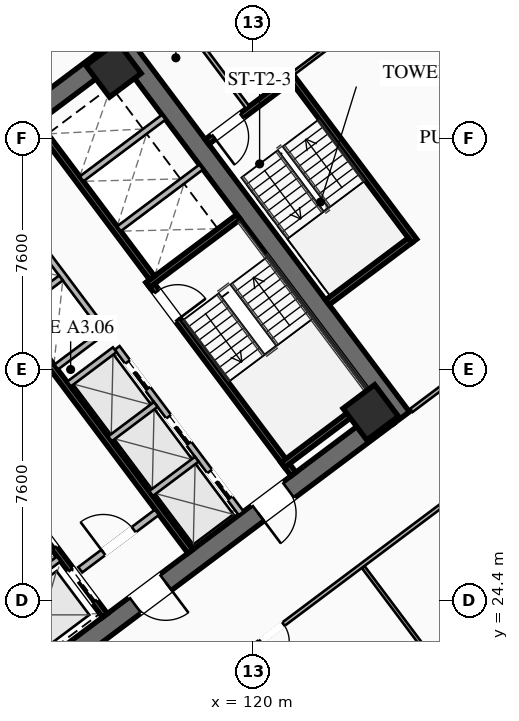
"""IFC4 building model, lengths in metres.
Left out: names, types, materials, properties, quantities, classifications, styles, units other than length and angle.
Written with IfcOpenShell. Run it as: python <this file> out.ifc"""

import sys

from ifc_helpers import new_model, si_unit, direction, frame, frame_2d, origin, origin_2d, place, context, subcontext, project, spatial, rectangle, hollow_rectangle, extrude, element, fill, save


model = new_model("IFC4")
c1 = context("Model", 3, precision=1e-05, world=origin(), true_north=direction((0.0, 1.0)))
c2 = subcontext(c1, "Body", "Model", "MODEL_VIEW")
j1 = project(units=[si_unit("LENGTHUNIT", "METRE"), si_unit("PLANEANGLEUNIT", "RADIAN")], contexts=[c1])
p1 = place(None, origin())
s1 = spatial("IfcSite", under=j1, at=p1, CompositionType="ELEMENT")
p2 = place(p1, origin())
s2 = spatial("IfcBuilding", under=s1, at=p2, CompositionType="ELEMENT")
p3 = place(p2, frame((0.0, 0.0, 28.15)))
s3 = spatial("IfcBuildingStorey", under=s2, at=p3, CompositionType="ELEMENT", Elevation=28.15)
p4 = place(p3, frame((115.524, 42.893, 0.0), z_axis=(0.0, 0.0, 1.0), x_axis=(0.600005007985, -0.799996243986, 0.0)))
e1 = element("IfcWall", 1, at=p4, inside=s3, PredefinedType="SHEAR", context=c2, shape_type="SweptSolid", body=[
    extrude(rectangle(XDim=15.6, YDim=0.65, at=frame_2d((7.8, 0.0))), origin(), (0.0, 0.0, 1.0), 3.55),
])
p5 = place(p3, frame((124.429, 30.478, 0.0), z_axis=(0.0, 0.0, 1.0), x_axis=(-0.799998028465, -0.600002628705, 0.0)))
e2 = element("IfcWall", 2, at=p5, inside=s3, PredefinedType="SHEAR", context=c2, shape_type="SweptSolid", body=[
    extrude(rectangle(XDim=14.86, YDim=0.65, at=frame_2d((7.43, 0.0))), origin(), (0.0, 0.0, 1.0), 3.55),
])
p6 = place(p5, frame((9.13, 0.0, 0.0)))
e3 = element("IfcOpeningElement", 3, at=p6, cuts=e2, PredefinedType="OPENING", context=c2, shape_type="SweptSolid", body=[
    extrude(rectangle(XDim=1.25, YDim=2.25, at=frame_2d((0.625, 1.125))), frame((0.0, 0.335, 0.0), z_axis=(0.0, -1.0, 0.0), x_axis=(1.0, 0.0, 0.0)), (0.0, 0.0, 1.0), 0.67),
])
p7 = place(p5, frame((4.08, 0.0, 0.0)))
e4 = element("IfcOpeningElement", 4, at=p7, cuts=e2, PredefinedType="OPENING", context=c2, shape_type="SweptSolid", body=[
    extrude(rectangle(XDim=1.25, YDim=2.25, at=frame_2d((0.625, 1.125))), frame((0.0, 0.335, 0.0), z_axis=(0.0, -1.0, 0.0), x_axis=(1.0, 0.0, 0.0)), (0.0, 0.0, 1.0), 0.67),
])
p8 = place(p3, frame((103.571, 33.522, 0.0), z_axis=(0.0, 0.0, 1.0), x_axis=(0.799998028465, 0.600002628705, 0.0)))
e5 = element("IfcWall", 5, at=p8, inside=s3, PredefinedType="SHEAR", context=c2, shape_type="SweptSolid", body=[
    extrude(rectangle(XDim=14.86, YDim=0.65, at=frame_2d((7.43, 0.0))), origin(), (0.0, 0.0, 1.0), 3.55),
])
p9 = place(p8, frame((4.48, 0.0, 0.0)))
e6 = element("IfcOpeningElement", 6, at=p9, cuts=e5, PredefinedType="OPENING", context=c2, shape_type="SweptSolid", body=[
    extrude(rectangle(XDim=1.25, YDim=2.25, at=frame_2d((0.625, 1.125))), frame((0.0, 0.335, 0.0), z_axis=(0.0, -1.0, 0.0), x_axis=(1.0, 0.0, 0.0)), (0.0, 0.0, 1.0), 0.67),
])
p10 = place(p8, frame((9.53, 0.0, 0.0)))
e7 = element("IfcOpeningElement", 7, at=p10, cuts=e5, PredefinedType="OPENING", context=c2, shape_type="SweptSolid", body=[
    extrude(rectangle(XDim=1.25, YDim=2.25, at=frame_2d((0.625, 1.125))), frame((0.0, 0.335, 0.0), z_axis=(0.0, -1.0, 0.0), x_axis=(1.0, 0.0, 0.0)), (0.0, 0.0, 1.0), 0.67),
])
for number, where, z_axis, x_axis in (
    (8, (123.87, 30.59, 0.0), (0.0, 0.0, 1.0), (0.8, 0.6, 0.0)),
    (9, (115.41, 41.87, 0.0), (0.0, 0.0, 1.0), (0.8, 0.6, 0.0)),
):
    element("IfcColumn", number, at=place(p3, frame(where, z_axis=z_axis, x_axis=x_axis)), inside=s3, PredefinedType="COLUMN", context=c2, shape_type="SweptSolid", body=[
        extrude(hollow_rectangle(XDim=1.3, YDim=1.3, WallThickness=0.05, at=origin_2d()), origin(), (0.0, 0.0, 1.0), 3.35),
    ])
p11 = place(p3, frame((116.56, 34.92, 0.0), z_axis=(0.0, 0.0, 1.0), x_axis=(0.600009827119, -0.799992629566, 0.0)))
e10 = element("IfcWall", 10, at=p11, inside=s3, PredefinedType="SHEAR", context=c2, shape_type="SweptSolid", body=[
    extrude(rectangle(XDim=7.95, YDim=0.2, at=frame_2d((3.975, 0.0))), origin(), (0.0, 0.0, 1.0), 3.35),
])
p12 = place(p11, frame((0.45, 0.0, 0.0)))
e11 = element("IfcOpeningElement", 11, at=p12, cuts=e10, PredefinedType="OPENING", context=c2, shape_type="SweptSolid", body=[
    extrude(rectangle(XDim=1.15, YDim=2.2, at=frame_2d((0.575, 1.1))), frame((0.0, 0.11, 0.0), z_axis=(0.0, -1.0, 0.0), x_axis=(1.0, 0.0, 0.0)), (0.0, 0.0, 1.0), 0.22),
])
for number, where, z_axis, x_axis in (
    (12, (116.54, 34.78, 0.0), (0.0, 0.0, 1.0), (0.8, 0.6, 0.0)),
    (13, (120.98, 28.86, 0.0), (0.0, 0.0, 1.0), (0.8, 0.6, 0.0)),
):
    element("IfcWall", number, at=place(p3, frame(where, z_axis=z_axis, x_axis=x_axis)), inside=s3, PredefinedType="SHEAR", context=c2, shape_type="SweptSolid", body=[
        extrude(rectangle(XDim=3.73, YDim=0.2, at=frame_2d((1.865, 0.0))), origin(), (0.0, 0.0, 1.0), 3.35),
    ])
p13 = place(p3, frame((117.938, 26.016, 0.0), z_axis=(0.0, 0.0, 1.0), x_axis=(-0.600005463273, 0.799995902516, 0.0)))
e14 = element("IfcWall", 14, at=p13, inside=s3, PredefinedType="SHEAR", context=c2, shape_type="SweptSolid", body=[
    extrude(rectangle(XDim=14.3, YDim=0.2, at=frame_2d((7.15, 0.0))), origin(), (0.0, 0.0, 1.0), 3.35),
])
p14 = place(p3, frame((114.316, 25.412, 0.0), z_axis=(0.0, 0.0, 1.0), x_axis=(0.800018601094, 0.59997519774, 0.0)))
e15 = element("IfcWall", 15, at=p14, inside=s3, PredefinedType="SOLIDWALL", context=c2, shape_type="SweptSolid", body=[
    extrude(rectangle(XDim=3.15, YDim=0.22, at=frame_2d((1.575, 0.0))), origin(), (0.0, 0.0, 1.0), 2.703),
])
p15 = place(p14, frame((0.95, 0.0, 0.0)))
e16 = element("IfcOpeningElement", 16, at=p15, cuts=e15, PredefinedType="OPENING", context=c2, shape_type="SweptSolid", body=[
    extrude(rectangle(XDim=1.25, YDim=2.25, at=frame_2d((0.625, 1.125))), frame((0.0, 0.12, 0.0), z_axis=(0.0, -1.0, 0.0), x_axis=(1.0, 0.0, 0.0)), (0.0, 0.0, 1.0), 0.24),
])
p16 = place(p3, frame((115.13, 23.91, 0.0), z_axis=(0.0, 0.0, 1.0), x_axis=(-0.599975393228, 0.800018454488, 0.0)))
e17 = element("IfcWall", 17, at=p16, inside=s3, PredefinedType="SHEAR", context=c2, shape_type="SweptSolid", body=[
    extrude(rectangle(XDim=6.35, YDim=0.2, at=frame_2d((3.175, 0.0))), origin(), (0.0, 0.0, 1.0), 3.35),
])
p17 = place(p16, frame((4.775, 0.0, 0.0)))
e18 = element("IfcOpeningElement", 18, at=p17, cuts=e17, PredefinedType="OPENING", context=c2, shape_type="SweptSolid", body=[
    extrude(rectangle(XDim=1.3, YDim=2.25, at=frame_2d((0.65, 1.125))), frame((0.0, 0.11, 0.0), z_axis=(0.0, -1.0, 0.0), x_axis=(1.0, 0.0, 0.0)), (0.0, 0.0, 1.0), 0.22),
])
p18 = place(p16, frame((2.775, 0.0, 0.0)))
e19 = element("IfcOpeningElement", 19, at=p18, cuts=e17, PredefinedType="OPENING", context=c2, shape_type="SweptSolid", body=[
    extrude(rectangle(XDim=1.3, YDim=2.25, at=frame_2d((0.65, 1.125))), frame((0.0, 0.11, 0.0), z_axis=(0.0, -1.0, 0.0), x_axis=(1.0, 0.0, 0.0)), (0.0, 0.0, 1.0), 0.22),
])
p19 = place(p16, frame((0.575, 0.0, 0.0)))
e20 = element("IfcOpeningElement", 20, at=p19, cuts=e17, PredefinedType="OPENING", context=c2, shape_type="SweptSolid", body=[
    extrude(rectangle(XDim=1.3, YDim=2.25, at=frame_2d((0.65, 1.125))), frame((0.0, 0.11, 0.0), z_axis=(0.0, -1.0, 0.0), x_axis=(1.0, 0.0, 0.0)), (0.0, 0.0, 1.0), 0.22),
])
p20 = place(p3, frame((110.906, 23.742, 0.0), z_axis=(0.0, 0.0, 1.0), x_axis=(0.8, 0.6, 0.0)))
e21 = element("IfcWall", 21, at=p20, inside=s3, PredefinedType="SOLIDWALL", context=c2, shape_type="SweptSolid", body=[
    extrude(rectangle(XDim=3.38, YDim=0.2, at=frame_2d((1.69, 0.0))), origin(), (0.0, 0.0, 1.0), 3.35),
])
p21 = place(p3, frame((112.87, 40.09, 0.0), z_axis=(0.0, 0.0, 1.0), x_axis=(0.599975393228, -0.800018454488, 0.0)))
e22 = element("IfcWall", 22, at=p21, inside=s3, PredefinedType="SHEAR", context=c2, shape_type="SweptSolid", body=[
    extrude(rectangle(XDim=6.35, YDim=0.2, at=frame_2d((3.175, 0.0))), origin(), (0.0, 0.0, 1.0), 3.35),
])
for number, where, z_axis, x_axis in (
    (23, (115.59, 36.63, 0.0), (0.0, 0.0, 1.0), (0.8, 0.6, 0.0)),
    (24, (114.36, 38.27, 0.0), (0.0, 0.0, 1.0), (0.8, 0.6, 0.0)),
):
    element("IfcWall", number, at=place(p3, frame(where, z_axis=z_axis, x_axis=x_axis)), inside=s3, PredefinedType="SOLIDWALL", context=c2, shape_type="SweptSolid", body=[
        extrude(rectangle(XDim=3.38, YDim=0.2, at=frame_2d((1.69, 0.0))), origin(), (0.0, 0.0, 1.0), 3.35),
    ])
p22 = place(p3, frame((119.61, 27.27, 0.0), z_axis=(0.0, 0.0, 1.0), x_axis=(-0.600011488909, 0.79999138319, 0.0)))
e25 = element("IfcWall", 25, at=p22, inside=s3, PredefinedType="SOLIDWALL", context=c2, shape_type="SweptSolid", body=[
    extrude(rectangle(XDim=6.8, YDim=0.2, at=frame_2d((3.4, 0.0))), origin(), (0.0, 0.0, 1.0), 3.35),
])
p23 = place(p22, frame((0.625, 0.0, 0.0)))
e26 = element("IfcOpeningElement", 26, at=p23, cuts=e25, PredefinedType="OPENING", context=c2, shape_type="SweptSolid", body=[
    extrude(rectangle(XDim=1.1, YDim=2.2, at=frame_2d((0.55, 1.1))), frame((0.0, 0.11, 0.0), z_axis=(0.0, -1.0, 0.0), x_axis=(1.0, 0.0, 0.0)), (0.0, 0.0, 1.0), 0.22),
])
p24 = place(p22, frame((2.875, 0.0, 0.0)))
e27 = element("IfcOpeningElement", 27, at=p24, cuts=e25, PredefinedType="OPENING", context=c2, shape_type="SweptSolid", body=[
    extrude(rectangle(XDim=1.1, YDim=2.2, at=frame_2d((0.55, 1.1))), frame((0.0, 0.11, 0.0), z_axis=(0.0, -1.0, 0.0), x_axis=(1.0, 0.0, 0.0)), (0.0, 0.0, 1.0), 0.22),
])
p25 = place(p22, frame((5.125, 0.0, 0.0)))
e28 = element("IfcOpeningElement", 28, at=p25, cuts=e25, PredefinedType="OPENING", context=c2, shape_type="SweptSolid", body=[
    extrude(rectangle(XDim=1.1, YDim=2.2, at=frame_2d((0.55, 1.1))), frame((0.0, 0.11, 0.0), z_axis=(0.0, -1.0, 0.0), x_axis=(1.0, 0.0, 0.0)), (0.0, 0.0, 1.0), 0.22),
])
p26 = place(p3, frame((116.646, 27.922, 0.0), z_axis=(0.0, 0.0, 1.0), x_axis=(0.8, 0.6, 0.0)))
e29 = element("IfcWall", 29, at=p26, inside=s3, PredefinedType="SOLIDWALL", context=c2, shape_type="SweptSolid", body=[
    extrude(rectangle(XDim=1.88, YDim=0.2, at=frame_2d((0.94, 0.0))), origin(), (0.0, 0.0, 1.0), 3.35),
])
p27 = place(p3, frame((115.296, 29.722, 0.0), z_axis=(0.0, 0.0, 1.0), x_axis=(0.799984418148, 0.600020775241, 0.0)))
e30 = element("IfcWall", 30, at=p27, inside=s3, PredefinedType="SOLIDWALL", context=c2, shape_type="SweptSolid", body=[
    extrude(rectangle(XDim=1.88, YDim=0.2, at=frame_2d((0.94, 0.0))), origin(), (0.0, 0.0, 1.0), 3.35),
])
p28 = place(p3, frame((113.946, 31.522, 0.0), z_axis=(0.0, 0.0, 1.0), x_axis=(0.8, 0.6, 0.0)))
e31 = element("IfcWall", 31, at=p28, inside=s3, PredefinedType="SOLIDWALL", context=c2, shape_type="SweptSolid", body=[
    extrude(rectangle(XDim=1.88, YDim=0.2, at=frame_2d((0.94, 0.0))), origin(), (0.0, 0.0, 1.0), 3.35),
])
p29 = place(p3, frame((115.11, 33.27, 0.0), z_axis=(0.0, 0.0, 1.0), x_axis=(-0.600011488909, 0.79999138319, 0.0)))
e32 = element("IfcWall", 32, at=p29, inside=s3, PredefinedType="SOLIDWALL", context=c2, shape_type="SweptSolid", body=[
    extrude(rectangle(XDim=6.8, YDim=0.2, at=frame_2d((3.4, 0.0))), origin(), (0.0, 0.0, 1.0), 3.35),
])
p30 = place(p3, frame((113.526, 32.082, 0.0), z_axis=(0.0, 0.0, 1.0), x_axis=(0.800046745961, 0.599937666993, 0.0)))
e33 = element("IfcWall", 33, at=p30, inside=s3, PredefinedType="SOLIDWALL", context=c2, shape_type="SweptSolid", body=[
    extrude(rectangle(XDim=1.88, YDim=0.2, at=frame_2d((0.94, 0.0))), origin(), (0.0, 0.0, 1.0), 3.35),
])
p31 = place(p3, frame((112.176, 33.882, 0.0), z_axis=(0.0, 0.0, 1.0), x_axis=(0.8, 0.6, 0.0)))
e34 = element("IfcWall", 34, at=p31, inside=s3, PredefinedType="SOLIDWALL", context=c2, shape_type="SweptSolid", body=[
    extrude(rectangle(XDim=1.88, YDim=0.2, at=frame_2d((0.94, 0.0))), origin(), (0.0, 0.0, 1.0), 3.35),
])
p32 = place(p3, frame((125.304, 36.228, 0.0), z_axis=(0.0, 0.0, 1.0), x_axis=(-0.59998851072, 0.800008616831, 0.0)))
e35 = element("IfcWall", 35, at=p32, inside=s3, PredefinedType="SHEAR", context=c2, shape_type="SweptSolid", body=[
    extrude(rectangle(XDim=6.8, YDim=0.2, at=frame_2d((3.4, 0.0))), origin(), (0.0, 0.0, 1.0), 3.35),
])
p33 = place(p3, frame((121.204, 41.528, 0.0), z_axis=(0.0, 0.0, 1.0), x_axis=(-0.800017232136, -0.599977023131, 0.0)))
e36 = element("IfcWall", 36, at=p33, inside=s3, PredefinedType="SHEAR", context=c2, shape_type="SweptSolid", body=[
    extrude(rectangle(XDim=3.4, YDim=0.2, at=frame_2d((1.7, 0.0))), origin(), (0.0, 0.0, 1.0), 3.35),
])
p34 = place(p33, frame((1.975, 0.0, 0.0)))
e37 = element("IfcOpeningElement", 37, at=p34, cuts=e36, PredefinedType="OPENING", context=c2, shape_type="SweptSolid", body=[
    extrude(rectangle(XDim=1.15, YDim=2.2, at=frame_2d((0.575, 1.1))), frame((0.0, 0.11, 0.0), z_axis=(0.0, -1.0, 0.0), x_axis=(1.0, 0.0, 0.0)), (0.0, 0.0, 1.0), 0.22),
])
p35 = place(p3, frame((122.444, 34.208, 0.0), z_axis=(0.0, 0.0, 1.0), x_axis=(0.79999138319, 0.600011488909, 0.0)))
e38 = element("IfcWall", 38, at=p35, inside=s3, PredefinedType="SHEAR", context=c2, shape_type="SweptSolid", body=[
    extrude(rectangle(XDim=3.4, YDim=0.2, at=frame_2d((1.7, 0.0))), origin(), (0.0, 0.0, 1.0), 3.35),
])
p36 = place(p3, frame((119.824, 40.618, 0.0), z_axis=(0.0, 0.0, 1.0), x_axis=(-0.599982243973, 0.800013316712, 0.0)))
e39 = element("IfcWall", 39, at=p36, inside=s3, PredefinedType="PARTITIONING", context=c2, shape_type="SweptSolid", body=[
    extrude(rectangle(XDim=4.4, YDim=0.135, at=frame_2d((2.2, 0.0))), origin(), (0.0, 0.0, 1.0), 2.703),
])
p37 = place(p3, frame((98.516, 34.012, 0.0), z_axis=(0.0, 0.0, 1.0), x_axis=(0.799998035726, 0.600002619023, 0.0)))
e40 = element("IfcWall", 40, at=p37, inside=s3, PredefinedType="PARTITIONING", context=c2, shape_type="SweptSolid", body=[
    extrude(rectangle(XDim=29.83, YDim=0.135, at=frame_2d((14.915, 0.0))), origin(), (0.0, 0.0, 1.0), 2.703),
])
p38 = place(p37, frame((0.3, 0.0, 0.0)))
e41 = element("IfcOpeningElement", 41, at=p38, cuts=e40, PredefinedType="OPENING", context=c2, shape_type="SweptSolid", body=[
    extrude(rectangle(XDim=0.95, YDim=2.05, at=frame_2d((0.475, 1.025))), frame((0.0, 0.077, 0.0), z_axis=(0.0, -1.0, 0.0), x_axis=(1.0, 0.0, 0.0)), (0.0, 0.0, 1.0), 0.155),
])
p39 = place(p37, frame((10.829, 0.0, 0.0)))
e42 = element("IfcOpeningElement", 42, at=p39, cuts=e40, PredefinedType="OPENING", context=c2, shape_type="SweptSolid", body=[
    extrude(rectangle(XDim=0.95, YDim=2.05, at=frame_2d((0.475, 1.025))), frame((0.0, 0.077, 0.0), z_axis=(0.0, -1.0, 0.0), x_axis=(1.0, 0.0, 0.0)), (0.0, 0.0, 1.0), 0.155),
])
p40 = place(p37, frame((28.58, 0.0, 0.0)))
e43 = element("IfcOpeningElement", 43, at=p40, cuts=e40, PredefinedType="OPENING", context=c2, shape_type="SweptSolid", body=[
    extrude(rectangle(XDim=0.95, YDim=2.05, at=frame_2d((0.475, 1.025))), frame((0.0, 0.077, 0.0), z_axis=(0.0, -1.0, 0.0), x_axis=(1.0, 0.0, 0.0)), (0.0, 0.0, 1.0), 0.155),
])
p41 = place(p3, frame((135.46, 34.47, 0.0), z_axis=(0.0, 0.0, 1.0), x_axis=(-0.800000982127, -0.599998690494, 0.0)))
e44 = element("IfcWall", 44, at=p41, inside=s3, PredefinedType="PARTITIONING", context=c2, shape_type="SweptSolid", body=[
    extrude(rectangle(XDim=29.83, YDim=0.135, at=frame_2d((14.915, 0.0))), origin(), (0.0, 0.0, 1.0), 2.703),
])
p42 = place(p41, frame((28.5, 0.0, 0.0)))
e45 = element("IfcOpeningElement", 45, at=p42, cuts=e44, PredefinedType="OPENING", context=c2, shape_type="SweptSolid", body=[
    extrude(rectangle(XDim=0.95, YDim=2.05, at=frame_2d((0.475, 1.025))), frame((0.0, 0.077, 0.0), z_axis=(0.0, -1.0, 0.0), x_axis=(1.0, 0.0, 0.0)), (0.0, 0.0, 1.0), 0.155),
])
p43 = place(p41, frame((18.075, 0.0, 0.0)))
e46 = element("IfcOpeningElement", 46, at=p43, cuts=e44, PredefinedType="OPENING", context=c2, shape_type="SweptSolid", body=[
    extrude(rectangle(XDim=0.95, YDim=2.05, at=frame_2d((0.475, 1.025))), frame((0.0, 0.077, 0.0), z_axis=(0.0, -1.0, 0.0), x_axis=(1.0, 0.0, 0.0)), (0.0, 0.0, 1.0), 0.155),
])
p44 = place(p41, frame((0.38, 0.0, 0.0)))
e47 = element("IfcOpeningElement", 47, at=p44, cuts=e44, PredefinedType="OPENING", context=c2, shape_type="SweptSolid", body=[
    extrude(rectangle(XDim=0.95, YDim=2.05, at=frame_2d((0.475, 1.025))), frame((0.0, 0.077, 0.0), z_axis=(0.0, -1.0, 0.0), x_axis=(1.0, 0.0, 0.0)), (0.0, 0.0, 1.0), 0.155),
])
p45 = place(p3, frame((130.048, 16.936, 0.0), z_axis=(0.0, 0.0, 1.0), x_axis=(-0.600007301277, 0.79999452399, 0.0)))
e48 = element("IfcWall", 48, at=p45, inside=s3, PredefinedType="PARTITIONING", context=c2, shape_type="SweptSolid", body=[
    extrude(rectangle(XDim=10.7, YDim=0.11, at=frame_2d((5.35, 0.0))), origin(), (0.0, 0.0, 1.0), 2.703),
])
p46 = place(p3, frame((125.208, 30.656, 0.0), z_axis=(0.0, 0.0, 1.0), x_axis=(0.799995666112, 0.600005778473, 0.0)))
e49 = element("IfcWall", 49, at=p46, inside=s3, PredefinedType="PARTITIONING", context=c2, shape_type="SweptSolid", body=[
    extrude(rectangle(XDim=13.52, YDim=0.135, at=frame_2d((6.76, 0.0))), origin(), (0.0, 0.0, 1.0), 2.703),
])
p47 = place(p46, frame((2.045, 0.0, 0.0)))
e50 = element("IfcOpeningElement", 50, at=p47, cuts=e49, PredefinedType="OPENING", context=c2, shape_type="SweptSolid", body=[
    extrude(rectangle(XDim=0.95, YDim=2.05, at=frame_2d((0.475, 1.025))), frame((0.0, 0.077, 0.0), z_axis=(0.0, -1.0, 0.0), x_axis=(1.0, 0.0, 0.0)), (0.0, 0.0, 1.0), 0.155),
])
p48 = place(p3, frame((129.304, 47.728, 0.0), z_axis=(0.0, 0.0, 1.0), x_axis=(-0.8, -0.6, 0.0)))
e51 = element("IfcWall", 51, at=p48, inside=s3, PredefinedType="PARTITIONING", context=c2, shape_type="SweptSolid", body=[
    extrude(rectangle(XDim=10.0, YDim=0.11, at=frame_2d((5.0, 0.0))), origin(), (0.0, 0.0, 1.0), 2.703),
])
p49 = place(p6, origin())
e52 = element("IfcDoor", 52, at=p49, inside=s3, OperationType="SINGLE_SWING_LEFT", PredefinedType="DOOR", context=c2, shape_type="SweptSolid", body=[
    extrude(rectangle(XDim=1.25, YDim=2.25, at=frame_2d((0.625, 1.125))), frame((0.0, 0.025, 0.0), z_axis=(0.0, -1.0, 0.0), x_axis=(1.0, 0.0, 0.0)), (0.0, 0.0, 1.0), 0.05),
])
fill(e3, e52)
p50 = place(p7, origin())
e53 = element("IfcDoor", 53, at=p50, inside=s3, OperationType="SINGLE_SWING_RIGHT", PredefinedType="DOOR", context=c2, shape_type="SweptSolid", body=[
    extrude(rectangle(XDim=1.25, YDim=2.25, at=frame_2d((0.625, 1.125))), frame((0.0, 0.025, 0.0), z_axis=(0.0, -1.0, 0.0), x_axis=(1.0, 0.0, 0.0)), (0.0, 0.0, 1.0), 0.05),
])
fill(e4, e53)
p51 = place(p12, origin())
e54 = element("IfcDoor", 54, at=p51, inside=s3, OperationType="SINGLE_SWING_RIGHT", PredefinedType="DOOR", context=c2, shape_type="SweptSolid", body=[
    extrude(rectangle(XDim=1.15, YDim=2.2, at=frame_2d((0.575, 1.1))), frame((0.0, 0.025, 0.0), z_axis=(0.0, -1.0, 0.0), x_axis=(1.0, 0.0, 0.0)), (0.0, 0.0, 1.0), 0.05),
])
fill(e11, e54)
p52 = place(p15, origin())
e55 = element("IfcDoor", 55, at=p52, inside=s3, OperationType="SINGLE_SWING_LEFT", PredefinedType="DOOR", context=c2, shape_type="SweptSolid", body=[
    extrude(rectangle(XDim=1.25, YDim=2.25, at=frame_2d((0.625, 1.125))), frame((0.0, 0.025, 0.0), z_axis=(0.0, -1.0, 0.0), x_axis=(1.0, 0.0, 0.0)), (0.0, 0.0, 1.0), 0.05),
])
fill(e16, e55)
p53 = place(p34, origin())
e56 = element("IfcDoor", 56, at=p53, inside=s3, OperationType="SINGLE_SWING_RIGHT", PredefinedType="DOOR", context=c2, shape_type="SweptSolid", body=[
    extrude(rectangle(XDim=1.15, YDim=2.2, at=frame_2d((0.575, 1.1))), frame((0.0, 0.025, 0.0), z_axis=(0.0, -1.0, 0.0), x_axis=(1.0, 0.0, 0.0)), (0.0, 0.0, 1.0), 0.05),
])
fill(e37, e56)
p54 = place(p43, origin())
e57 = element("IfcDoor", 57, at=p54, inside=s3, OperationType="SINGLE_SWING_RIGHT", PredefinedType="DOOR", context=c2, shape_type="SweptSolid", body=[
    extrude(rectangle(XDim=0.95, YDim=2.05, at=frame_2d((0.475, 1.025))), frame((0.0, 0.025, 0.0), z_axis=(0.0, -1.0, 0.0), x_axis=(1.0, 0.0, 0.0)), (0.0, 0.0, 1.0), 0.05),
])
fill(e46, e57)
p55 = place(p18, origin())
e58 = element("IfcDoor", 58, at=p55, inside=s3, OperationType="SLIDING_TO_LEFT", PredefinedType="DOOR", context=c2, shape_type="SweptSolid", body=[
    extrude(rectangle(XDim=1.3, YDim=2.25, at=frame_2d((0.65, 1.125))), frame((0.0, 0.025, 0.0), z_axis=(0.0, -1.0, 0.0), x_axis=(1.0, 0.0, 0.0)), (0.0, 0.0, 1.0), 0.05),
])
fill(e19, e58)
p56 = place(p19, origin())
e59 = element("IfcDoor", 59, at=p56, inside=s3, OperationType="SLIDING_TO_LEFT", PredefinedType="DOOR", context=c2, shape_type="SweptSolid", body=[
    extrude(rectangle(XDim=1.3, YDim=2.25, at=frame_2d((0.65, 1.125))), frame((0.0, 0.025, 0.0), z_axis=(0.0, -1.0, 0.0), x_axis=(1.0, 0.0, 0.0)), (0.0, 0.0, 1.0), 0.05),
])
fill(e20, e59)
p57 = place(p23, origin())
e60 = element("IfcDoor", 60, at=p57, inside=s3, OperationType="SLIDING_TO_LEFT", PredefinedType="DOOR", context=c2, shape_type="SweptSolid", body=[
    extrude(rectangle(XDim=1.1, YDim=2.2, at=frame_2d((0.55, 1.1))), frame((0.0, 0.025, 0.0), z_axis=(0.0, -1.0, 0.0), x_axis=(1.0, 0.0, 0.0)), (0.0, 0.0, 1.0), 0.05),
])
fill(e26, e60)
p58 = place(p24, origin())
e61 = element("IfcDoor", 61, at=p58, inside=s3, OperationType="SLIDING_TO_LEFT", PredefinedType="DOOR", context=c2, shape_type="SweptSolid", body=[
    extrude(rectangle(XDim=1.1, YDim=2.2, at=frame_2d((0.55, 1.1))), frame((0.0, 0.025, 0.0), z_axis=(0.0, -1.0, 0.0), x_axis=(1.0, 0.0, 0.0)), (0.0, 0.0, 1.0), 0.05),
])
fill(e27, e61)
p59 = place(p25, origin())
e62 = element("IfcDoor", 62, at=p59, inside=s3, OperationType="SLIDING_TO_LEFT", PredefinedType="DOOR", context=c2, shape_type="SweptSolid", body=[
    extrude(rectangle(XDim=1.1, YDim=2.2, at=frame_2d((0.55, 1.1))), frame((0.0, 0.025, 0.0), z_axis=(0.0, -1.0, 0.0), x_axis=(1.0, 0.0, 0.0)), (0.0, 0.0, 1.0), 0.05),
])
fill(e28, e62)
save(model, sys.argv[1])
